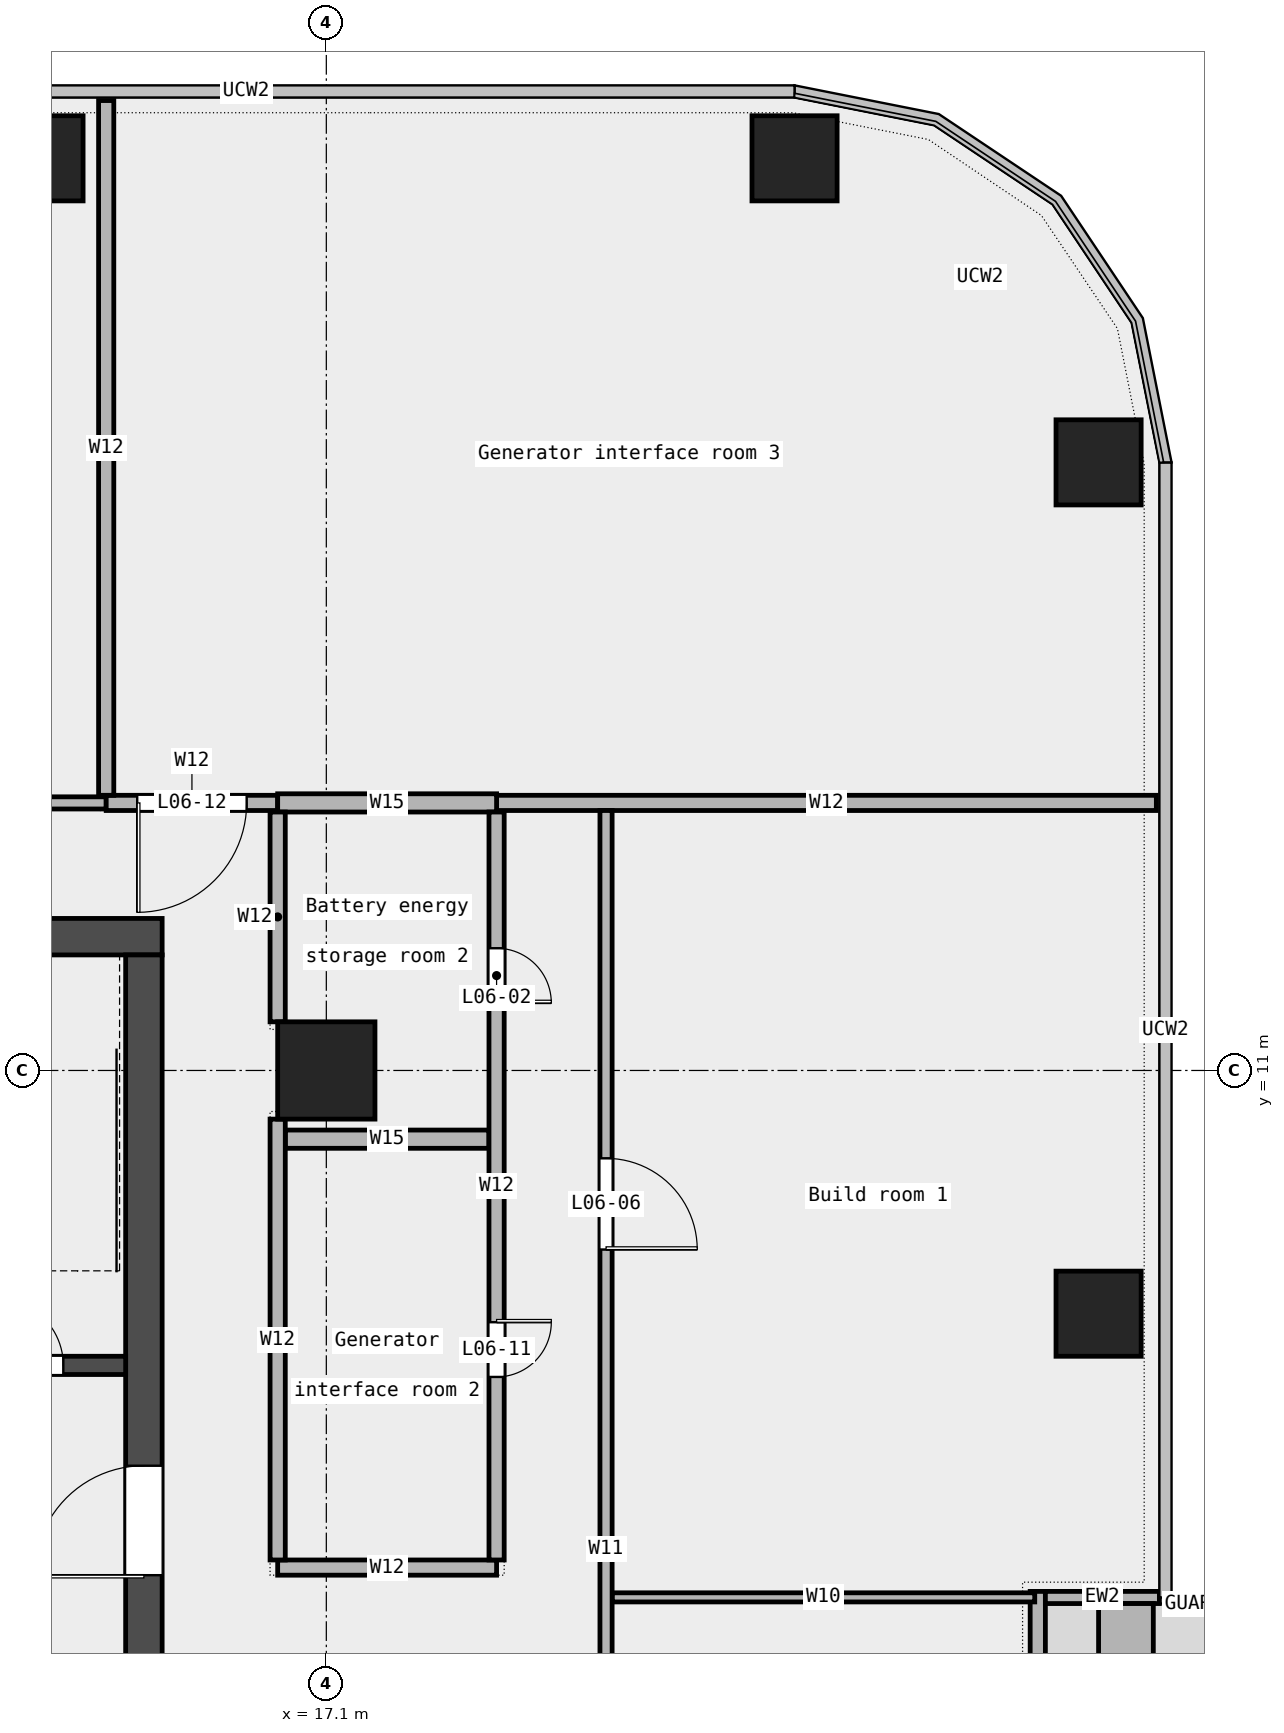
"""IFC4 building model, lengths in metres.
Left out: names, types, materials, properties, quantities, classifications, styles, units other than length and angle.
Written with IfcOpenShell. Run it as: python <this file> out.ifc"""

import sys

from ifc_helpers import new_model, si_unit, direction, frame, frame_2d, origin, origin_2d, place, context, subcontext, project, spatial, rectangle, extrude, element, fill, save


model = new_model("IFC4")
c1 = context("Model", 3, precision=1e-05, world=origin(), true_north=direction((0.0, 1.0)))
c2 = subcontext(c1, "Body", "Model", "MODEL_VIEW")
j1 = project(units=[si_unit("LENGTHUNIT", "METRE"), si_unit("PLANEANGLEUNIT", "RADIAN")], contexts=[c1])
p1 = place(None, origin())
s1 = spatial("IfcSite", under=j1, at=p1, CompositionType="ELEMENT")
p2 = place(p1, origin())
s2 = spatial("IfcBuilding", under=s1, at=p2, CompositionType="ELEMENT")
p3 = place(p2, frame((0.0, 0.0, 35.8)))
s3 = spatial("IfcBuildingStorey", under=s2, at=p3, CompositionType="ELEMENT", Elevation=35.8)
for number, where, z_axis, x_axis in (
    (1, (29.8, 7.0, 0.0), (0.0, 0.0, 1.0), (1.0, 0.0, 0.0)),
    (2, (29.8, 21.0, 0.0), (0.0, 0.0, 1.0), (1.0, 0.0, 0.0)),
    (3, (24.8, 26.0, 0.0), (0.0, 0.0, 1.0), (1.0, 0.0, 0.0)),
    (4, (12.4, 26.0, 0.0), (0.0, 0.0, 1.0), (1.0, 0.0, 0.0)),
):
    element("IfcColumn", number, at=place(p3, frame(where, z_axis=z_axis, x_axis=x_axis)), inside=s3, PredefinedType="COLUMN", context=c2, shape_type="SweptSolid", body=[
        extrude(rectangle(XDim=1.4, YDim=1.4, at=origin_2d()), origin(), (0.0, 0.0, 1.0), 4.35),
    ])
p4 = place(p3, frame((17.1, 11.0, 0.0), z_axis=(0.0, 0.0, 1.0), x_axis=(1.0, 0.0, 0.0)))
e5 = element("IfcColumn", 5, at=p4, inside=s3, PredefinedType="COLUMN", context=c2, shape_type="SweptSolid", body=[
    extrude(rectangle(XDim=1.6, YDim=1.6, at=origin_2d()), origin(), (0.0, 0.0, 1.0), 4.35),
])
p5 = place(p3, frame((28.8, -11.767, 0.0), z_axis=(0.0, 0.0, 1.0), x_axis=(0.0, 1.0, 0.0)))
e6 = element("IfcWall", 6, at=p5, inside=s3, PredefinedType="STANDARD", context=c2, shape_type="SweptSolid", body=[
    extrude(rectangle(XDim=14.2, YDim=0.25, at=frame_2d((7.1, 0.0))), origin(), (0.0, 0.0, 1.0), 4.35),
])
p6 = place(p5, frame((1.75, 0.0, 0.45)))
e7 = element("IfcOpeningElement", 7, at=p6, cuts=e6, PredefinedType="OPENING", context=c2, shape_type="SweptSolid", body=[
    extrude(rectangle(XDim=1.5, YDim=3.0, at=frame_2d((0.75, 1.5))), frame((0.0, 0.137, 0.0), z_axis=(0.0, -1.0, 0.0), x_axis=(1.0, 0.0, 0.0)), (0.0, 0.0, 1.0), 0.274),
])
p7 = place(p5, frame((6.25, 0.0, 0.0)))
e8 = element("IfcOpeningElement", 8, at=p7, cuts=e6, PredefinedType="OPENING", context=c2, shape_type="SweptSolid", body=[
    extrude(rectangle(XDim=1.8, YDim=2.4, at=frame_2d((0.9, 1.2))), frame((0.0, 0.137, 0.0), z_axis=(0.0, -1.0, 0.0), x_axis=(1.0, 0.0, 0.0)), (0.0, 0.0, 1.0), 0.274),
])
p8 = place(p5, frame((11.0, 0.0, 0.45)))
e9 = element("IfcOpeningElement", 9, at=p8, cuts=e6, PredefinedType="OPENING", context=c2, shape_type="SweptSolid", body=[
    extrude(rectangle(XDim=1.5, YDim=3.0, at=frame_2d((0.75, 1.5))), frame((0.0, 0.137, 0.0), z_axis=(0.0, -1.0, 0.0), x_axis=(1.0, 0.0, 0.0)), (0.0, 0.0, 1.0), 0.274),
])
p9 = place(p3, frame((30.8, 2.333, 0.0), z_axis=(0.0, 0.0, 1.0), x_axis=(-1.0, 0.0, 0.0)))
e10 = element("IfcWall", 10, at=p9, inside=s3, PredefinedType="STANDARD", context=c2, shape_type="SweptSolid", body=[
    extrude(rectangle(XDim=1.875, YDim=0.2, at=frame_2d((0.938, 0.0))), origin(), (0.0, 0.0, 1.0), 4.35),
])
p10 = place(p3, frame((30.25, -1.367, 0.0), z_axis=(0.0, 0.0, 1.0), x_axis=(0.0, 1.0, 0.0)))
e11 = element("IfcWall", 11, at=p10, inside=s3, PredefinedType="STANDARD", context=c2, shape_type="SweptSolid", body=[
    extrude(rectangle(XDim=3.6, YDim=0.9, at=frame_2d((1.8, 0.0))), origin(), (0.0, 0.0, 1.0), 0.7),
])
p11 = place(p3, frame((21.8, 2.335, 0.0), z_axis=(0.0, 0.0, 1.0), x_axis=(1.0, 0.0, 0.0)))
e12 = element("IfcWall", 12, at=p11, inside=s3, PredefinedType="PARTITIONING", context=c2, shape_type="SweptSolid", body=[
    extrude(rectangle(XDim=6.95, YDim=0.15, at=frame_2d((3.475, 0.0))), origin(), (0.0, 0.0, 1.0), 4.35),
])
p12 = place(p3, frame((16.3, 2.825, 0.0), z_axis=(0.0, 0.0, 1.0), x_axis=(1.0, 0.0, 0.0)))
e13 = element("IfcWall", 13, at=p12, inside=s3, PredefinedType="PARTITIONING", context=c2, shape_type="SweptSolid", body=[
    extrude(rectangle(XDim=3.6, YDim=0.25, at=frame_2d((1.8, 0.0))), origin(), (0.0, 0.0, 1.0), 4.35),
])
p13 = place(p3, frame((16.425, 9.87, 0.0), z_axis=(0.0, 0.0, 1.0), x_axis=(1.0, 0.0, 0.0)))
e14 = element("IfcWall", 14, at=p13, inside=s3, PredefinedType="PARTITIONING", context=c2, shape_type="SweptSolid", body=[
    extrude(rectangle(XDim=3.35, YDim=0.3, at=frame_2d((1.675, 0.0))), origin(), (0.0, 0.0, 1.0), 4.35),
])
p14 = place(p3, frame((-6.765, 15.4, 0.0), z_axis=(0.0, 0.0, 1.0), x_axis=(1.0, 0.0, 0.0)))
e15 = element("IfcWall", 15, at=p14, inside=s3, PredefinedType="PARTITIONING", context=c2, shape_type="SweptSolid", body=[
    extrude(rectangle(XDim=20.245, YDim=0.2, at=frame_2d((10.123, 0.0))), origin(), (0.0, 0.0, 1.0), 4.35),
])
p15 = place(p14, frame((6.015, 0.0, 0.0)))
e16 = element("IfcOpeningElement", 16, at=p15, cuts=e15, PredefinedType="OPENING", context=c2, shape_type="SweptSolid", body=[
    extrude(rectangle(XDim=1.5, YDim=2.1, at=frame_2d((0.75, 1.05))), frame((0.0, 0.112, 0.0), z_axis=(0.0, -1.0, 0.0), x_axis=(1.0, 0.0, 0.0)), (0.0, 0.0, 1.0), 0.224),
])
p16 = place(p14, frame((16.288, 0.0, 0.0)))
e17 = element("IfcOpeningElement", 17, at=p16, cuts=e15, PredefinedType="OPENING", context=c2, shape_type="SweptSolid", body=[
    extrude(rectangle(XDim=1.2, YDim=2.1, at=frame_2d((0.6, 1.05))), frame((0.0, 0.112, 0.0), z_axis=(0.0, -1.0, 0.0), x_axis=(1.0, 0.0, 0.0)), (0.0, 0.0, 1.0), 0.224),
])
p17 = place(p3, frame((13.48, 15.4, 0.0), z_axis=(0.0, 0.0, 1.0), x_axis=(1.0, 0.0, 0.0)))
e18 = element("IfcWall", 18, at=p17, inside=s3, PredefinedType="PARTITIONING", context=c2, shape_type="SweptSolid", body=[
    extrude(rectangle(XDim=2.82, YDim=0.25, at=frame_2d((1.41, 0.0))), origin(), (0.0, 0.0, 1.0), 4.35),
])
p18 = place(p17, frame((0.51, 0.0, 0.0)))
e19 = element("IfcOpeningElement", 19, at=p18, cuts=e18, PredefinedType="OPENING", context=c2, shape_type="SweptSolid", body=[
    extrude(rectangle(XDim=1.8, YDim=2.1, at=frame_2d((0.9, 1.05))), frame((0.0, 0.137, 0.0), z_axis=(0.0, -1.0, 0.0), x_axis=(1.0, 0.0, 0.0)), (0.0, 0.0, 1.0), 0.274),
])
p19 = place(p3, frame((19.9, 15.4, 0.0), z_axis=(0.0, 0.0, 1.0), x_axis=(1.0, 0.0, 0.0)))
e20 = element("IfcWall", 20, at=p19, inside=s3, PredefinedType="PARTITIONING", context=c2, shape_type="SweptSolid", body=[
    extrude(rectangle(XDim=10.85, YDim=0.25, at=frame_2d((5.425, 0.0))), origin(), (0.0, 0.0, 1.0), 4.35),
])
p20 = place(p3, frame((16.3, 15.4, 0.0), z_axis=(0.0, 0.0, 1.0), x_axis=(1.0, 0.0, 0.0)))
e21 = element("IfcWall", 21, at=p20, inside=s3, PredefinedType="PARTITIONING", context=c2, shape_type="SweptSolid", body=[
    extrude(rectangle(XDim=3.6, YDim=0.3, at=frame_2d((1.8, 0.0))), origin(), (0.0, 0.0, 1.0), 4.35),
])
p21 = place(p3, frame((13.48, 15.525, 0.0), z_axis=(0.0, 0.0, 1.0), x_axis=(0.0, 1.0, 0.0)))
e22 = element("IfcWall", 22, at=p21, inside=s3, PredefinedType="PARTITIONING", context=c2, shape_type="SweptSolid", body=[
    extrude(rectangle(XDim=11.425, YDim=0.25, at=frame_2d((5.712, 0.0))), origin(), (0.0, 0.0, 1.0), 4.35),
])
p22 = place(p3, frame((16.3, 2.95, 0.0), z_axis=(0.0, 0.0, 1.0), x_axis=(0.0, 1.0, 0.0)))
e23 = element("IfcWall", 23, at=p22, inside=s3, PredefinedType="PARTITIONING", context=c2, shape_type="SweptSolid", body=[
    extrude(rectangle(XDim=7.25, YDim=0.25, at=frame_2d((3.625, 0.0))), origin(), (0.0, 0.0, 1.0), 4.35),
])
p23 = place(p3, frame((16.3, 11.8, 0.0), z_axis=(0.0, 0.0, 1.0), x_axis=(0.0, 1.0, 0.0)))
e24 = element("IfcWall", 24, at=p23, inside=s3, PredefinedType="PARTITIONING", context=c2, shape_type="SweptSolid", body=[
    extrude(rectangle(XDim=3.45, YDim=0.25, at=frame_2d((1.725, 0.0))), origin(), (0.0, 0.0, 1.0), 4.35),
])
p24 = place(p3, frame((19.9, 2.95, 0.0), z_axis=(0.0, 0.0, 1.0), x_axis=(0.0, 1.0, 0.0)))
e25 = element("IfcWall", 25, at=p24, inside=s3, PredefinedType="PARTITIONING", context=c2, shape_type="SweptSolid", body=[
    extrude(rectangle(XDim=12.3, YDim=0.25, at=frame_2d((6.15, 0.0))), origin(), (0.0, 0.0, 1.0), 4.35),
])
p25 = place(p24, frame((9.16, 0.0, 0.0)))
e26 = element("IfcOpeningElement", 26, at=p25, cuts=e25, PredefinedType="OPENING", context=c2, shape_type="SweptSolid", body=[
    extrude(rectangle(XDim=0.9, YDim=2.1, at=frame_2d((0.45, 1.05))), frame((0.0, 0.137, 0.0), z_axis=(0.0, -1.0, 0.0), x_axis=(1.0, 0.0, 0.0)), (0.0, 0.0, 1.0), 0.274),
])
p26 = place(p24, frame((3.01, 0.0, 0.0)))
e27 = element("IfcOpeningElement", 27, at=p26, cuts=e25, PredefinedType="OPENING", context=c2, shape_type="SweptSolid", body=[
    extrude(rectangle(XDim=0.9, YDim=2.1, at=frame_2d((0.45, 1.05))), frame((0.0, 0.137, 0.0), z_axis=(0.0, -1.0, 0.0), x_axis=(1.0, 0.0, 0.0)), (0.0, 0.0, 1.0), 0.274),
])
p27 = place(p3, frame((21.7, -9.0, 0.0), z_axis=(0.0, 0.0, 1.0), x_axis=(0.0, 1.0, 0.0)))
e28 = element("IfcWall", 28, at=p27, inside=s3, PredefinedType="PARTITIONING", context=c2, shape_type="SweptSolid", body=[
    extrude(rectangle(XDim=24.275, YDim=0.2, at=frame_2d((12.137, 0.0))), origin(), (0.0, 0.0, 1.0), 4.35),
])
p28 = place(p27, frame((4.768, 0.0, 0.0)))
e29 = element("IfcOpeningElement", 29, at=p28, cuts=e28, PredefinedType="OPENING", context=c2, shape_type="SweptSolid", body=[
    extrude(rectangle(XDim=1.8, YDim=2.1, at=frame_2d((0.9, 1.05))), frame((0.0, 0.112, 0.0), z_axis=(0.0, -1.0, 0.0), x_axis=(1.0, 0.0, 0.0)), (0.0, 0.0, 1.0), 0.224),
])
p29 = place(p27, frame((17.055, 0.0, 0.0)))
e30 = element("IfcOpeningElement", 30, at=p29, cuts=e28, PredefinedType="OPENING", context=c2, shape_type="SweptSolid", body=[
    extrude(rectangle(XDim=1.5, YDim=2.1, at=frame_2d((0.75, 1.05))), frame((0.0, 0.112, 0.0), z_axis=(0.0, -1.0, 0.0), x_axis=(1.0, 0.0, 0.0)), (0.0, 0.0, 1.0), 0.224),
])
p30 = place(p3, frame((-14.4, 13.2, 0.0), z_axis=(0.0, 0.0, 1.0), x_axis=(1.0, 0.0, 0.0)))
e31 = element("IfcWall", 31, at=p30, inside=s3, PredefinedType="SHEAR", context=c2, shape_type="SweptSolid", body=[
    extrude(rectangle(XDim=28.8, YDim=0.6, at=frame_2d((14.4, 0.0))), origin(), (0.0, 0.0, 1.0), 4.5),
])
p31 = place(p30, frame((6.4, 0.0, 0.0)))
e32 = element("IfcOpeningElement", 32, at=p31, cuts=e31, PredefinedType="OPENING", context=c2, shape_type="SweptSolid", body=[
    extrude(rectangle(XDim=1.0, YDim=2.1, at=frame_2d((0.5, 1.05))), frame((0.0, 0.312, 0.0), z_axis=(0.0, -1.0, 0.0), x_axis=(1.0, 0.0, 0.0)), (0.0, 0.0, 1.0), 0.624),
])
p32 = place(p30, frame((11.462, 0.0, 0.0)))
e33 = element("IfcOpeningElement", 33, at=p32, cuts=e31, PredefinedType="OPENING", context=c2, shape_type="SweptSolid", body=[
    extrude(rectangle(XDim=1.0, YDim=2.1, at=frame_2d((0.5, 1.05))), frame((0.0, 0.312, 0.0), z_axis=(0.0, -1.0, 0.0), x_axis=(1.0, 0.0, 0.0)), (0.0, 0.0, 1.0), 0.624),
])
p33 = place(p30, frame((16.337, 0.0, 0.0)))
e34 = element("IfcOpeningElement", 34, at=p33, cuts=e31, PredefinedType="OPENING", context=c2, shape_type="SweptSolid", body=[
    extrude(rectangle(XDim=1.0, YDim=2.1, at=frame_2d((0.5, 1.05))), frame((0.0, 0.312, 0.0), z_axis=(0.0, -1.0, 0.0), x_axis=(1.0, 0.0, 0.0)), (0.0, 0.0, 1.0), 0.624),
])
p34 = place(p30, frame((21.775, 0.0, 0.0)))
e35 = element("IfcOpeningElement", 35, at=p34, cuts=e31, PredefinedType="OPENING", context=c2, shape_type="SweptSolid", body=[
    extrude(rectangle(XDim=1.0, YDim=2.1, at=frame_2d((0.5, 1.05))), frame((0.0, 0.312, 0.0), z_axis=(0.0, -1.0, 0.0), x_axis=(1.0, 0.0, 0.0)), (0.0, 0.0, 1.0), 0.624),
])
p35 = place(p3, frame((14.1, -6.6, 0.0), z_axis=(0.0, 0.0, 1.0), x_axis=(0.0, 1.0, 0.0)))
e36 = element("IfcWall", 36, at=p35, inside=s3, PredefinedType="SHEAR", context=c2, shape_type="SweptSolid", body=[
    extrude(rectangle(XDim=19.5, YDim=0.6, at=frame_2d((9.75, 0.0))), origin(), (0.0, 0.0, 1.0), 4.5),
])
p36 = place(p35, frame((9.3, 0.0, 0.0)))
e37 = element("IfcOpeningElement", 37, at=p36, cuts=e36, PredefinedType="OPENING", context=c2, shape_type="SweptSolid", body=[
    extrude(rectangle(XDim=1.8, YDim=2.1, at=frame_2d((0.9, 1.05))), frame((0.0, 0.312, 0.0), z_axis=(0.0, -1.0, 0.0), x_axis=(1.0, 0.0, 0.0)), (0.0, 0.0, 1.0), 0.624),
])
p37 = place(p3, frame((10.65, 6.15, 0.0), z_axis=(0.0, 0.0, 1.0), x_axis=(1.0, 0.0, 0.0)))
e38 = element("IfcWall", 38, at=p37, inside=s3, PredefinedType="SOLIDWALL", context=c2, shape_type="SweptSolid", body=[
    extrude(rectangle(XDim=3.15, YDim=0.3, at=frame_2d((1.575, 0.0))), origin(), (0.0, 0.0, 1.0), 4.5),
])
p38 = place(p37, frame((1.025, 0.0, 0.0)))
e39 = element("IfcOpeningElement", 39, at=p38, cuts=e38, PredefinedType="OPENING", context=c2, shape_type="SweptSolid", body=[
    extrude(rectangle(XDim=1.1, YDim=2.1, at=frame_2d((0.55, 1.05))), frame((0.0, 0.162, 0.0), z_axis=(0.0, -1.0, 0.0), x_axis=(1.0, 0.0, 0.0)), (0.0, 0.0, 1.0), 0.324),
])
p39 = place(p25, origin())
e40 = element("IfcDoor", 40, at=p39, inside=s3, OperationType="SINGLE_SWING_RIGHT", PredefinedType="DOOR", context=c2, shape_type="SweptSolid", body=[
    extrude(rectangle(XDim=0.9, YDim=2.1, at=frame_2d((0.45, 1.05))), frame((0.0, 0.025, 0.0), z_axis=(0.0, -1.0, 0.0), x_axis=(1.0, 0.0, 0.0)), (0.0, 0.0, 1.0), 0.05),
])
fill(e26, e40)
p40 = place(p29, origin())
e41 = element("IfcDoor", 41, at=p40, inside=s3, OperationType="DOUBLE_DOOR_SINGLE_SWING", PredefinedType="DOOR", context=c2, shape_type="SweptSolid", body=[
    extrude(rectangle(XDim=1.5, YDim=2.1, at=frame_2d((0.75, 1.05))), frame((0.0, 0.025, 0.0), z_axis=(0.0, -1.0, 0.0), x_axis=(1.0, 0.0, 0.0)), (0.0, 0.0, 1.0), 0.05),
])
fill(e30, e41)
p41 = place(p26, origin())
e42 = element("IfcDoor", 42, at=p41, inside=s3, OperationType="SINGLE_SWING_LEFT", PredefinedType="DOOR", context=c2, shape_type="SweptSolid", body=[
    extrude(rectangle(XDim=0.9, YDim=2.1, at=frame_2d((0.45, 1.05))), frame((0.0, 0.025, 0.0), z_axis=(0.0, -1.0, 0.0), x_axis=(1.0, 0.0, 0.0)), (0.0, 0.0, 1.0), 0.05),
])
fill(e27, e42)
p42 = place(p18, origin())
e43 = element("IfcDoor", 43, at=p42, inside=s3, OperationType="DOUBLE_DOOR_SINGLE_SWING", PredefinedType="DOOR", context=c2, shape_type="SweptSolid", body=[
    extrude(rectangle(XDim=1.8, YDim=2.1, at=frame_2d((0.9, 1.05))), frame((0.0, 0.025, 0.0), z_axis=(0.0, -1.0, 0.0), x_axis=(1.0, 0.0, 0.0)), (0.0, 0.0, 1.0), 0.05),
])
fill(e19, e43)
p43 = place(p38, origin())
e44 = element("IfcDoor", 44, at=p43, inside=s3, OperationType="SINGLE_SWING_RIGHT", PredefinedType="DOOR", context=c2, shape_type="SweptSolid", body=[
    extrude(rectangle(XDim=1.1, YDim=2.1, at=frame_2d((0.55, 1.05))), frame((0.0, 0.025, 0.0), z_axis=(0.0, -1.0, 0.0), x_axis=(1.0, 0.0, 0.0)), (0.0, 0.0, 1.0), 0.05),
])
fill(e39, e44)
p44 = place(p36, origin())
e45 = element("IfcDoor", 45, at=p44, inside=s3, OperationType="DOUBLE_DOOR_SINGLE_SWING", PredefinedType="DOOR", context=c2, shape_type="SweptSolid", body=[
    extrude(rectangle(XDim=1.8, YDim=2.1, at=frame_2d((0.9, 1.05))), frame((0.0, 0.025, 0.0), z_axis=(0.0, -1.0, 0.0), x_axis=(1.0, 0.0, 0.0)), (0.0, 0.0, 1.0), 0.05),
])
fill(e37, e45)
save(model, sys.argv[1])
